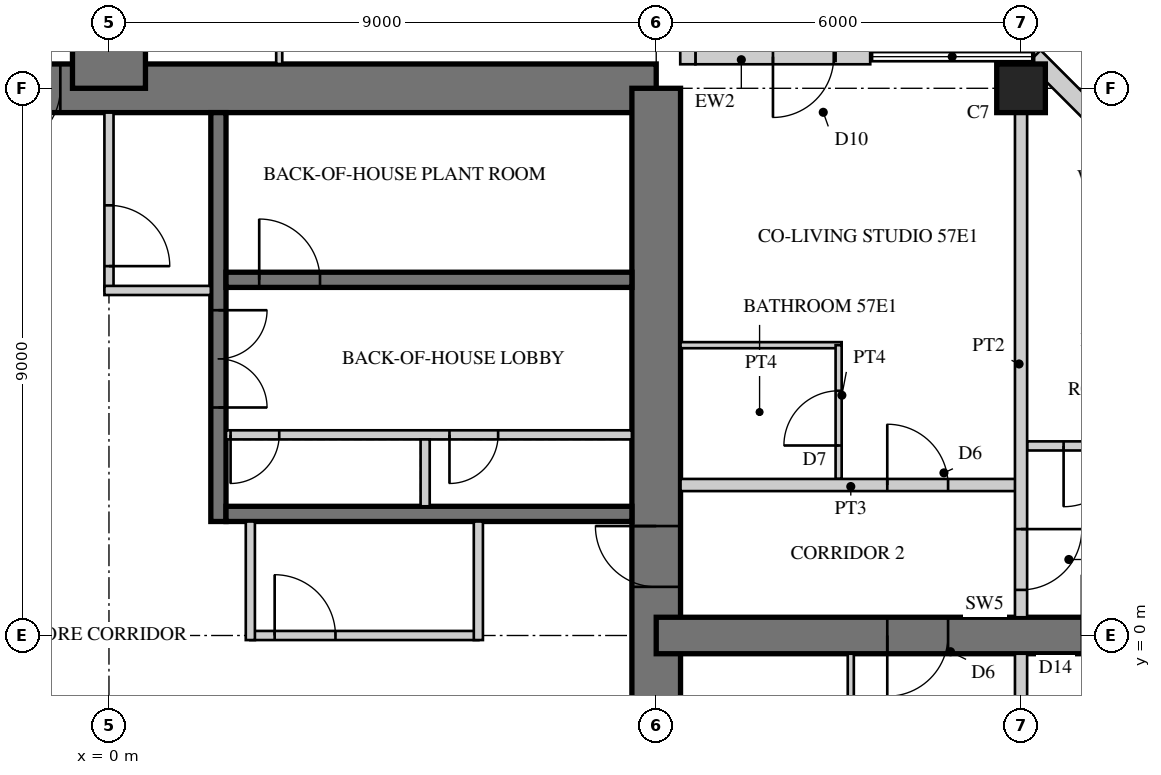
"""IFC4 building model, lengths in metres.
Left out: names, types, materials, properties, quantities, classifications, styles, units other than length and angle.
Written with IfcOpenShell. Run it as: python <this file> out.ifc"""

import sys

from ifc_helpers import new_model, si_unit, direction, frame, frame_2d, origin, origin_2d, place, context, subcontext, project, spatial, rectangle, hollow_rectangle, extrude, element, fill, save


model = new_model("IFC4")
c1 = context("Model", 3, precision=1e-05, world=origin(), true_north=direction((0.0, 1.0)))
c2 = subcontext(c1, "Body", "Model", "MODEL_VIEW")
j1 = project(units=[si_unit("LENGTHUNIT", "METRE"), si_unit("PLANEANGLEUNIT", "RADIAN")], contexts=[c1])
p1 = place(None, origin())
s1 = spatial("IfcSite", under=j1, at=p1, CompositionType="ELEMENT")
p2 = place(p1, origin())
s2 = spatial("IfcBuilding", under=s1, at=p2, CompositionType="ELEMENT")
p3 = place(p2, frame((0.0, 0.0, 225.5)))
s3 = spatial("IfcBuildingStorey", under=s2, at=p3, CompositionType="ELEMENT", Elevation=225.5)
p4 = place(p3, frame((9.0, 9.0, 0.0), z_axis=(0.0, 0.0, 1.0), x_axis=(-1.0, 0.0, 0.0)))
e1 = element("IfcWall", 1, at=p4, inside=s3, PredefinedType="SHEAR", context=c2, shape_type="SweptSolid", body=[
    extrude(rectangle(XDim=18.0, YDim=0.8, at=frame_2d((9.0, 0.0))), origin(), (0.0, 0.0, 1.0), 3.4),
])
p5 = place(p4, frame((9.8, 0.0, 0.0)))
e2 = element("IfcOpeningElement", 2, at=p5, cuts=e1, PredefinedType="OPENING", context=c2, shape_type="SweptSolid", body=[
    extrude(rectangle(XDim=1.0, YDim=2.4, at=frame_2d((0.5, 1.2))), frame((0.0, 0.41, 0.0), z_axis=(0.0, -1.0, 0.0), x_axis=(1.0, 0.0, 0.0)), (0.0, 0.0, 1.0), 0.82),
])
p6 = place(p3, frame((9.0, -9.0, 0.0), z_axis=(0.0, 0.0, 1.0), x_axis=(0.0, 1.0, 0.0)))
e3 = element("IfcWall", 3, at=p6, inside=s3, PredefinedType="SHEAR", context=c2, shape_type="SweptSolid", body=[
    extrude(rectangle(XDim=18.0, YDim=0.8, at=frame_2d((9.0, 0.0))), origin(), (0.0, 0.0, 1.0), 3.4),
])
p7 = place(p6, frame((9.8, 0.0, 0.0)))
e4 = element("IfcOpeningElement", 4, at=p7, cuts=e3, PredefinedType="OPENING", context=c2, shape_type="SweptSolid", body=[
    extrude(rectangle(XDim=1.0, YDim=2.4, at=frame_2d((0.5, 1.2))), frame((0.0, 0.41, 0.0), z_axis=(0.0, -1.0, 0.0), x_axis=(1.0, 0.0, 0.0)), (0.0, 0.0, 1.0), 0.82),
])
p8 = place(p3, frame((1.8, 1.875, 0.0), z_axis=(0.0, 0.0, 1.0), x_axis=(0.0, 1.0, 0.0)))
e5 = element("IfcWall", 5, at=p8, inside=s3, PredefinedType="SHEAR", context=c2, shape_type="SweptSolid", body=[
    extrude(rectangle(XDim=6.725, YDim=0.25, at=frame_2d((3.363, 0.0))), origin(), (0.0, 0.0, 1.0), 3.4),
])
p9 = place(p8, frame((1.875, 0.0, 0.0)))
e6 = element("IfcOpeningElement", 6, at=p9, cuts=e5, PredefinedType="OPENING", context=c2, shape_type="SweptSolid", body=[
    extrude(rectangle(XDim=1.6, YDim=2.4, at=frame_2d((0.8, 1.2))), frame((0.0, 0.135, 0.0), z_axis=(0.0, -1.0, 0.0), x_axis=(1.0, 0.0, 0.0)), (0.0, 0.0, 1.0), 0.27),
])
p10 = place(p3, frame((1.925, 2.0, 0.0), z_axis=(0.0, 0.0, 1.0), x_axis=(1.0, 0.0, 0.0)))
e7 = element("IfcWall", 7, at=p10, inside=s3, PredefinedType="SHEAR", context=c2, shape_type="SweptSolid", body=[
    extrude(rectangle(XDim=6.675, YDim=0.25, at=frame_2d((3.337, 0.0))), origin(), (0.0, 0.0, 1.0), 3.4),
])
p11 = place(p3, frame((1.925, 5.85, 0.0), z_axis=(0.0, 0.0, 1.0), x_axis=(1.0, 0.0, 0.0)))
e8 = element("IfcWall", 8, at=p11, inside=s3, PredefinedType="SHEAR", context=c2, shape_type="SweptSolid", body=[
    extrude(rectangle(XDim=6.675, YDim=0.25, at=frame_2d((3.337, 0.0))), origin(), (0.0, 0.0, 1.0), 3.4),
])
p12 = place(p11, frame((0.546, 0.0, 0.0)))
e9 = element("IfcOpeningElement", 9, at=p12, cuts=e8, PredefinedType="OPENING", context=c2, shape_type="SweptSolid", body=[
    extrude(rectangle(XDim=1.0, YDim=2.1, at=frame_2d((0.5, 1.05))), frame((0.0, 0.135, 0.0), z_axis=(0.0, -1.0, 0.0), x_axis=(1.0, 0.0, 0.0)), (0.0, 0.0, 1.0), 0.27),
])
p13 = place(p3, frame((1.925, 3.3, 0.0), z_axis=(0.0, 0.0, 1.0), x_axis=(1.0, 0.0, 0.0)))
e10 = element("IfcWall", 10, at=p13, inside=s3, PredefinedType="PARTITIONING", context=c2, shape_type="SweptSolid", body=[
    extrude(rectangle(XDim=6.675, YDim=0.15, at=frame_2d((3.337, 0.0))), origin(), (0.0, 0.0, 1.0), 3.4),
])
p14 = place(p13, frame((0.075, 0.0, 0.0)))
e11 = element("IfcOpeningElement", 11, at=p14, cuts=e10, PredefinedType="OPENING", context=c2, shape_type="SweptSolid", body=[
    extrude(rectangle(XDim=0.8, YDim=2.1, at=frame_2d((0.4, 1.05))), frame((0.0, 0.085, 0.0), z_axis=(0.0, -1.0, 0.0), x_axis=(1.0, 0.0, 0.0)), (0.0, 0.0, 1.0), 0.17),
])
p15 = place(p13, frame((3.675, 0.0, 0.0)))
e12 = element("IfcOpeningElement", 12, at=p15, cuts=e10, PredefinedType="OPENING", context=c2, shape_type="SweptSolid", body=[
    extrude(rectangle(XDim=0.8, YDim=2.1, at=frame_2d((0.4, 1.05))), frame((0.0, 0.085, 0.0), z_axis=(0.0, -1.0, 0.0), x_axis=(1.0, 0.0, 0.0)), (0.0, 0.0, 1.0), 0.17),
])
p16 = place(p3, frame((5.2, 2.125, 0.0), z_axis=(0.0, 0.0, 1.0), x_axis=(0.0, 1.0, 0.0)))
e13 = element("IfcWall", 13, at=p16, inside=s3, PredefinedType="PARTITIONING", context=c2, shape_type="SweptSolid", body=[
    extrude(rectangle(XDim=1.1, YDim=0.15, at=frame_2d((0.55, 0.0))), origin(), (0.0, 0.0, 1.0), 3.4),
])
p17 = place(p3, frame((0.0, 9.0, 0.0), z_axis=(0.0, 0.0, 1.0), x_axis=(0.0, 1.0, 0.0)))
e14 = element("IfcWall", 14, at=p17, inside=s3, PredefinedType="SHEAR", context=c2, shape_type="SweptSolid", body=[
    extrude(rectangle(XDim=9.0, YDim=1.2, at=frame_2d((4.5, 0.0))), origin(), (0.0, 0.0, 1.0), 3.4),
])
p18 = place(p17, frame((3.8, 0.0, 0.0)))
e15 = element("IfcOpeningElement", 15, at=p18, cuts=e14, PredefinedType="OPENING", context=c2, shape_type="SweptSolid", body=[
    extrude(rectangle(XDim=1.0, YDim=2.15, at=frame_2d((0.5, 1.075))), frame((0.0, 0.61, 0.0), z_axis=(0.0, -1.0, 0.0), x_axis=(1.0, 0.0, 0.0)), (0.0, 0.0, 1.0), 1.22),
])
p19 = place(p17, frame((7.0, 0.0, 0.0)))
e16 = element("IfcOpeningElement", 16, at=p19, cuts=e14, PredefinedType="OPENING", context=c2, shape_type="SweptSolid", body=[
    extrude(rectangle(XDim=1.0, YDim=2.2, at=frame_2d((0.5, 1.1))), frame((0.0, 0.61, 0.0), z_axis=(0.0, -1.0, 0.0), x_axis=(1.0, 0.0, 0.0)), (0.0, 0.0, 1.0), 1.22),
])
p20 = place(p3, frame((9.0, 0.0, 0.0), z_axis=(0.0, 0.0, 1.0), x_axis=(1.0, 0.0, 0.0)))
e17 = element("IfcWall", 17, at=p20, inside=s3, PredefinedType="SHEAR", context=c2, shape_type="SweptSolid", body=[
    extrude(rectangle(XDim=9.0, YDim=0.6, at=frame_2d((4.5, 0.0))), origin(), (0.0, 0.0, 1.0), 3.4),
])
p21 = place(p20, frame((3.8, 0.0, 0.0)))
e18 = element("IfcOpeningElement", 18, at=p21, cuts=e17, PredefinedType="OPENING", context=c2, shape_type="SweptSolid", body=[
    extrude(rectangle(XDim=1.0, YDim=2.15, at=frame_2d((0.5, 1.075))), frame((0.0, 0.31, 0.0), z_axis=(0.0, -1.0, 0.0), x_axis=(1.0, 0.0, 0.0)), (0.0, 0.0, 1.0), 0.62),
])
p22 = place(p20, frame((7.0, 0.0, 0.0)))
e19 = element("IfcOpeningElement", 19, at=p22, cuts=e17, PredefinedType="OPENING", context=c2, shape_type="SweptSolid", body=[
    extrude(rectangle(XDim=1.0, YDim=2.2, at=frame_2d((0.5, 1.1))), frame((0.0, 0.31, 0.0), z_axis=(0.0, -1.0, 0.0), x_axis=(1.0, 0.0, 0.0)), (0.0, 0.0, 1.0), 0.62),
])
p23 = place(p3, frame((15.0, 9.0, 0.0), z_axis=(0.0, 0.0, 1.0), x_axis=(1.0, 0.0, 0.0)))
e20 = element("IfcColumn", 20, at=p23, inside=s3, PredefinedType="COLUMN", context=c2, shape_type="SweptSolid", body=[
    extrude(rectangle(XDim=0.8, YDim=0.8, at=origin_2d()), origin(), (0.0, 0.0, 1.0), 3.4),
])
p24 = place(p3, frame((18.52, 6.215, 0.0), z_axis=(0.0, 0.0, 1.0), x_axis=(-0.707106781187, 0.707106781187, 0.0)))
e21 = element("IfcWall", 21, at=p24, inside=s3, PredefinedType="SOLIDWALL", context=c2, shape_type="SweptSolid", body=[
    extrude(rectangle(XDim=4.674, YDim=0.3, at=frame_2d((2.337, 0.0))), origin(), (0.0, 0.0, 1.0), 3.22),
])
p25 = place(p24, frame((1.887, 0.0, 0.3)))
e22 = element("IfcOpeningElement", 22, at=p25, cuts=e21, PredefinedType="OPENING", context=c2, shape_type="SweptSolid", body=[
    extrude(rectangle(XDim=0.9, YDim=2.4, at=frame_2d((0.45, 1.2))), frame((0.0, 0.16, 0.0), z_axis=(0.0, -1.0, 0.0), x_axis=(1.0, 0.0, 0.0)), (0.0, 0.0, 1.0), 0.32),
])
p26 = place(p3, frame((12.52, 9.52, 0.0), z_axis=(0.0, 0.0, 1.0), x_axis=(-1.0, 0.0, 0.0)))
e23 = element("IfcWall", 23, at=p26, inside=s3, PredefinedType="SOLIDWALL", context=c2, shape_type="SweptSolid", body=[
    extrude(rectangle(XDim=2.875, YDim=0.25, at=frame_2d((1.438, 0.0))), origin(), (0.0, 0.0, 1.0), 3.22),
])
p27 = place(p26, frame((0.6, 0.0, 0.0)))
e24 = element("IfcOpeningElement", 24, at=p27, cuts=e23, PredefinedType="OPENING", context=c2, shape_type="SweptSolid", body=[
    extrude(rectangle(XDim=1.0, YDim=2.2, at=frame_2d((0.5, 1.1))), frame((0.0, 0.135, 0.0), z_axis=(0.0, -1.0, 0.0), x_axis=(1.0, 0.0, 0.0)), (0.0, 0.0, 1.0), 0.27),
])
p28 = place(p3, frame((9.52, 9.395, 0.0), z_axis=(0.0, 0.0, 1.0), x_axis=(0.0, 1.0, 0.0)))
e25 = element("IfcWall", 25, at=p28, inside=s3, PredefinedType="SOLIDWALL", context=c2, shape_type="SweptSolid", body=[
    extrude(rectangle(XDim=3.125, YDim=0.25, at=frame_2d((1.562, 0.0))), origin(), (0.0, 0.0, 1.0), 3.22),
])
p29 = place(p28, frame((0.6, 0.0, 0.0)))
e26 = element("IfcOpeningElement", 26, at=p29, cuts=e25, PredefinedType="OPENING", context=c2, shape_type="SweptSolid", body=[
    extrude(rectangle(XDim=1.0, YDim=2.2, at=frame_2d((0.5, 1.1))), frame((0.0, 0.135, 0.0), z_axis=(0.0, -1.0, 0.0), x_axis=(1.0, 0.0, 0.0)), (0.0, 0.0, 1.0), 0.27),
])
p30 = place(p3, frame((2.325, 0.0, 0.0), z_axis=(0.0, 0.0, 1.0), x_axis=(1.0, 0.0, 0.0)))
e27 = element("IfcWall", 27, at=p30, inside=s3, PredefinedType="PARTITIONING", context=c2, shape_type="SweptSolid", body=[
    extrude(rectangle(XDim=3.75, YDim=0.15, at=frame_2d((1.875, 0.0))), origin(), (0.0, 0.0, 1.0), 3.22),
])
p31 = place(p30, frame((0.4, 0.0, 0.0)))
e28 = element("IfcOpeningElement", 28, at=p31, cuts=e27, PredefinedType="OPENING", context=c2, shape_type="SweptSolid", body=[
    extrude(rectangle(XDim=1.0, YDim=2.1, at=frame_2d((0.5, 1.05))), frame((0.0, 0.085, 0.0), z_axis=(0.0, -1.0, 0.0), x_axis=(1.0, 0.0, 0.0)), (0.0, 0.0, 1.0), 0.17),
])
for number, where, z_axis, x_axis in (
    (29, (2.325, 1.875, 0.0), (0.0, 0.0, 1.0), (0.0, -1.0, 0.0)),
    (30, (6.075, -0.075, 0.0), (0.0, 0.0, 1.0), (0.0, 1.0, 0.0)),
):
    element("IfcWall", number, at=place(p3, frame(where, z_axis=z_axis, x_axis=x_axis)), inside=s3, PredefinedType="PARTITIONING", context=c2, shape_type="SweptSolid", body=[
        extrude(rectangle(XDim=1.95, YDim=0.15, at=frame_2d((0.975, 0.0))), origin(), (0.0, 0.0, 1.0), 3.22),
    ])
p32 = place(p3, frame((0.0, 5.675, 0.0), z_axis=(0.0, 0.0, 1.0), x_axis=(0.0, 1.0, 0.0)))
e31 = element("IfcWall", 31, at=p32, inside=s3, PredefinedType="PARTITIONING", context=c2, shape_type="SweptSolid", body=[
    extrude(rectangle(XDim=2.925, YDim=0.15, at=frame_2d((1.462, 0.0))), origin(), (0.0, 0.0, 1.0), 3.22),
])
p33 = place(p32, frame((0.4, 0.0, 0.0)))
e32 = element("IfcOpeningElement", 32, at=p33, cuts=e31, PredefinedType="OPENING", context=c2, shape_type="SweptSolid", body=[
    extrude(rectangle(XDim=1.0, YDim=2.1, at=frame_2d((0.5, 1.05))), frame((0.0, 0.085, 0.0), z_axis=(0.0, -1.0, 0.0), x_axis=(1.0, 0.0, 0.0)), (0.0, 0.0, 1.0), 0.17),
])
p34 = place(p3, frame((1.675, 5.675, 0.0), z_axis=(0.0, 0.0, 1.0), x_axis=(-1.0, 0.0, 0.0)))
e33 = element("IfcWall", 33, at=p34, inside=s3, PredefinedType="PARTITIONING", context=c2, shape_type="SweptSolid", body=[
    extrude(rectangle(XDim=1.75, YDim=0.15, at=frame_2d((0.875, 0.0))), origin(), (0.0, 0.0, 1.0), 3.22),
])
for number, where, z_axis, x_axis in (
    (34, (2.8, 9.4, 0.0), (0.0, 0.0, 1.0), (0.0, 1.0, 0.0)),
    (35, (9.4, 4.775, 0.0), (0.0, 0.0, 1.0), (1.0, 0.0, 0.0)),
):
    element("IfcWall", number, at=place(p3, frame(where, z_axis=z_axis, x_axis=x_axis)), inside=s3, PredefinedType="PARTITIONING", context=c2, shape_type="SweptSolid", body=[
        extrude(rectangle(XDim=2.65, YDim=0.1, at=frame_2d((1.325, 0.0))), origin(), (0.0, 0.0, 1.0), 3.22),
    ])
p35 = place(p3, frame((12.0, 2.575, 0.0), z_axis=(0.0, 0.0, 1.0), x_axis=(0.0, 1.0, 0.0)))
e36 = element("IfcWall", 36, at=p35, inside=s3, PredefinedType="PARTITIONING", context=c2, shape_type="SweptSolid", body=[
    extrude(rectangle(XDim=2.2, YDim=0.1, at=frame_2d((1.1, 0.0))), origin(), (0.0, 0.0, 1.0), 3.22),
])
p36 = place(p35, frame((0.55, 0.0, 0.0)))
e37 = element("IfcOpeningElement", 37, at=p36, cuts=e36, PredefinedType="OPENING", context=c2, shape_type="SweptSolid", body=[
    extrude(rectangle(XDim=0.9, YDim=2.1, at=frame_2d((0.45, 1.05))), frame((0.0, 0.06, 0.0), z_axis=(0.0, -1.0, 0.0), x_axis=(1.0, 0.0, 0.0)), (0.0, 0.0, 1.0), 0.12),
])
p37 = place(p3, frame((12.2, -2.9, 0.0), z_axis=(0.0, 0.0, 1.0), x_axis=(0.0, 1.0, 0.0)))
e38 = element("IfcWall", 38, at=p37, inside=s3, PredefinedType="PARTITIONING", context=c2, shape_type="SweptSolid", body=[
    extrude(rectangle(XDim=2.6, YDim=0.1, at=frame_2d((1.3, 0.0))), origin(), (0.0, 0.0, 1.0), 3.22),
])
p38 = place(p37, frame((0.55, 0.0, 0.0)))
e39 = element("IfcOpeningElement", 39, at=p38, cuts=e38, PredefinedType="OPENING", context=c2, shape_type="SweptSolid", body=[
    extrude(rectangle(XDim=0.9, YDim=2.1, at=frame_2d((0.45, 1.05))), frame((0.0, 0.06, 0.0), z_axis=(0.0, -1.0, 0.0), x_axis=(1.0, 0.0, 0.0)), (0.0, 0.0, 1.0), 0.12),
])
p39 = place(p3, frame((9.4, 2.475, 0.0), z_axis=(0.0, 0.0, 1.0), x_axis=(1.0, 0.0, 0.0)))
e40 = element("IfcWall", 40, at=p39, inside=s3, PredefinedType="SOLIDWALL", context=c2, shape_type="SweptSolid", body=[
    extrude(rectangle(XDim=5.6, YDim=0.2, at=frame_2d((2.8, 0.0))), origin(), (0.0, 0.0, 1.0), 3.22),
])
p40 = place(p39, frame((3.4, 0.0, 0.0)))
e41 = element("IfcOpeningElement", 41, at=p40, cuts=e40, PredefinedType="OPENING", context=c2, shape_type="SweptSolid", body=[
    extrude(rectangle(XDim=1.0, YDim=2.15, at=frame_2d((0.5, 1.075))), frame((0.0, 0.11, 0.0), z_axis=(0.0, -1.0, 0.0), x_axis=(1.0, 0.0, 0.0)), (0.0, 0.0, 1.0), 0.22),
])
p41 = place(p3, frame((15.1, 3.118, 0.0), z_axis=(0.0, 0.0, 1.0), x_axis=(1.0, 0.0, 0.0)))
e42 = element("IfcWall", 42, at=p41, inside=s3, PredefinedType="PARTITIONING", context=c2, shape_type="SweptSolid", body=[
    extrude(rectangle(XDim=3.38, YDim=0.15, at=frame_2d((1.69, 0.0))), origin(), (0.0, 0.0, 1.0), 3.22),
])
p42 = place(p41, frame((0.6, 0.0, 0.0)))
e43 = element("IfcOpeningElement", 43, at=p42, cuts=e42, PredefinedType="OPENING", context=c2, shape_type="SweptSolid", body=[
    extrude(rectangle(XDim=1.0, YDim=2.1, at=frame_2d((0.5, 1.05))), frame((0.0, 0.085, 0.0), z_axis=(0.0, -1.0, 0.0), x_axis=(1.0, 0.0, 0.0)), (0.0, 0.0, 1.0), 0.17),
])
p43 = place(p3, frame((15.0, -8.6, 0.0), z_axis=(0.0, 0.0, 1.0), x_axis=(0.0, 1.0, 0.0)))
e44 = element("IfcWall", 44, at=p43, inside=s3, PredefinedType="SOLIDWALL", context=c2, shape_type="SweptSolid", body=[
    extrude(rectangle(XDim=8.3, YDim=0.2, at=frame_2d((4.15, 0.0))), origin(), (0.0, 0.0, 1.0), 2.52),
])
p44 = place(p3, frame((15.0, 0.3, 0.0), z_axis=(0.0, 0.0, 1.0), x_axis=(0.0, 1.0, 0.0)))
e45 = element("IfcWall", 45, at=p44, inside=s3, PredefinedType="SOLIDWALL", context=c2, shape_type="SweptSolid", body=[
    extrude(rectangle(XDim=8.3, YDim=0.2, at=frame_2d((4.15, 0.0))), origin(), (0.0, 0.0, 1.0), 2.52),
])
p45 = place(p44, frame((0.45, 0.0, 0.0)))
e46 = element("IfcOpeningElement", 46, at=p45, cuts=e45, PredefinedType="OPENING", context=c2, shape_type="SweptSolid", body=[
    extrude(rectangle(XDim=1.0, YDim=2.2, at=frame_2d((0.5, 1.1))), frame((0.0, 0.11, 0.0), z_axis=(0.0, -1.0, 0.0), x_axis=(1.0, 0.0, 0.0)), (0.0, 0.0, 1.0), 0.22),
])
p46 = place(p27, origin())
e47 = element("IfcDoor", 47, at=p46, inside=s3, OperationType="SINGLE_SWING_RIGHT", PredefinedType="DOOR", context=c2, shape_type="SweptSolid", body=[
    extrude(hollow_rectangle(XDim=1.0, YDim=2.2, WallThickness=0.06, at=frame_2d((0.5, 1.1))), frame((0.0, 0.025, 0.0), z_axis=(0.0, -1.0, 0.0), x_axis=(1.0, 0.0, 0.0)), (0.0, 0.0, 1.0), 0.05),
    extrude(rectangle(XDim=0.879, YDim=2.079, at=frame_2d((0.5, 1.1))), frame((0.0, 0.025, 0.0), z_axis=(0.0, -1.0, 0.0), x_axis=(1.0, 0.0, 0.0)), (0.0, 0.0, 1.0), 0.05),
])
fill(e24, e47)
p47 = place(p31, origin())
e48 = element("IfcDoor", 48, at=p47, inside=s3, OperationType="SINGLE_SWING_LEFT", PredefinedType="DOOR", context=c2, shape_type="SweptSolid", body=[
    extrude(rectangle(XDim=1.0, YDim=2.1, at=frame_2d((0.5, 1.05))), frame((0.0, 0.025, 0.0), z_axis=(0.0, -1.0, 0.0), x_axis=(1.0, 0.0, 0.0)), (0.0, 0.0, 1.0), 0.05),
])
fill(e28, e48)
p48 = place(p33, frame((1.0, 0.0, 0.0), z_axis=(0.0, 0.0, 1.0), x_axis=(-1.0, 0.0, 0.0)))
e49 = element("IfcDoor", 49, at=p48, inside=s3, OperationType="SINGLE_SWING_RIGHT", PredefinedType="DOOR", context=c2, shape_type="SweptSolid", body=[
    extrude(rectangle(XDim=1.0, YDim=2.1, at=frame_2d((0.5, 1.05))), frame((0.0, 0.025, 0.0), z_axis=(0.0, -1.0, 0.0), x_axis=(1.0, 0.0, 0.0)), (0.0, 0.0, 1.0), 0.05),
])
fill(e32, e49)
p49 = place(p36, origin())
e50 = element("IfcDoor", 50, at=p49, inside=s3, OperationType="SINGLE_SWING_LEFT", PredefinedType="DOOR", context=c2, shape_type="SweptSolid", body=[
    extrude(rectangle(XDim=0.9, YDim=2.1, at=frame_2d((0.45, 1.05))), frame((0.0, 0.025, 0.0), z_axis=(0.0, -1.0, 0.0), x_axis=(1.0, 0.0, 0.0)), (0.0, 0.0, 1.0), 0.05),
])
fill(e37, e50)
p50 = place(p40, origin())
e51 = element("IfcDoor", 51, at=p50, inside=s3, OperationType="SINGLE_SWING_LEFT", PredefinedType="DOOR", context=c2, shape_type="SweptSolid", body=[
    extrude(rectangle(XDim=1.0, YDim=2.15, at=frame_2d((0.5, 1.075))), frame((0.0, 0.025, 0.0), z_axis=(0.0, -1.0, 0.0), x_axis=(1.0, 0.0, 0.0)), (0.0, 0.0, 1.0), 0.05),
])
fill(e41, e51)
p51 = place(p42, frame((1.0, 0.0, 0.0), z_axis=(0.0, 0.0, 1.0), x_axis=(-1.0, 0.0, 0.0)))
e52 = element("IfcDoor", 52, at=p51, inside=s3, OperationType="SINGLE_SWING_RIGHT", PredefinedType="DOOR", context=c2, shape_type="SweptSolid", body=[
    extrude(rectangle(XDim=1.0, YDim=2.1, at=frame_2d((0.5, 1.05))), frame((0.0, 0.025, 0.0), z_axis=(0.0, -1.0, 0.0), x_axis=(1.0, 0.0, 0.0)), (0.0, 0.0, 1.0), 0.05),
])
fill(e43, e52)
p52 = place(p45, frame((1.0, 0.0, 0.0), z_axis=(0.0, 0.0, 1.0), x_axis=(-1.0, 0.0, 0.0)))
e53 = element("IfcDoor", 53, at=p52, inside=s3, OperationType="SINGLE_SWING_LEFT", PredefinedType="DOOR", context=c2, shape_type="SweptSolid", body=[
    extrude(rectangle(XDim=1.0, YDim=2.2, at=frame_2d((0.5, 1.1))), frame((0.0, 0.025, 0.0), z_axis=(0.0, -1.0, 0.0), x_axis=(1.0, 0.0, 0.0)), (0.0, 0.0, 1.0), 0.05),
])
fill(e46, e53)
p53 = place(p21, frame((1.0, 0.0, 0.0), z_axis=(0.0, 0.0, 1.0), x_axis=(-1.0, 0.0, 0.0)))
e54 = element("IfcDoor", 54, at=p53, inside=s3, OperationType="SINGLE_SWING_RIGHT", PredefinedType="DOOR", context=c2, shape_type="SweptSolid", body=[
    extrude(rectangle(XDim=1.0, YDim=2.15, at=frame_2d((0.5, 1.075))), frame((0.0, 0.025, 0.0), z_axis=(0.0, -1.0, 0.0), x_axis=(1.0, 0.0, 0.0)), (0.0, 0.0, 1.0), 0.05),
])
fill(e18, e54)
p54 = place(p5, origin())
e55 = element("IfcDoor", 55, at=p54, inside=s3, OperationType="SINGLE_SWING_RIGHT", PredefinedType="DOOR", context=c2, shape_type="SweptSolid", body=[
    extrude(rectangle(XDim=1.0, YDim=2.4, at=frame_2d((0.5, 1.2))), frame((0.0, 0.055, 0.0), z_axis=(0.0, -1.0, 0.0), x_axis=(1.0, 0.0, 0.0)), (0.0, 0.0, 1.0), 0.05),
])
fill(e2, e55)
p55 = place(p7, origin())
e56 = element("IfcDoor", 56, at=p55, inside=s3, OperationType="SINGLE_SWING_RIGHT", PredefinedType="DOOR", context=c2, shape_type="SweptSolid", body=[
    extrude(rectangle(XDim=1.0, YDim=2.4, at=frame_2d((0.5, 1.2))), frame((0.0, 0.055, 0.0), z_axis=(0.0, -1.0, 0.0), x_axis=(1.0, 0.0, 0.0)), (0.0, 0.0, 1.0), 0.05),
])
fill(e4, e56)
p56 = place(p9, frame((1.6, 0.0, 0.0), z_axis=(0.0, 0.0, 1.0), x_axis=(-1.0, 0.0, 0.0)))
e57 = element("IfcDoor", 57, at=p56, inside=s3, OperationType="DOUBLE_DOOR_SINGLE_SWING", PredefinedType="DOOR", context=c2, shape_type="SweptSolid", body=[
    extrude(rectangle(XDim=1.6, YDim=2.4, at=frame_2d((0.8, 1.2))), frame((0.0, 0.025, 0.0), z_axis=(0.0, -1.0, 0.0), x_axis=(1.0, 0.0, 0.0)), (0.0, 0.0, 1.0), 0.05),
])
fill(e6, e57)
p57 = place(p14, frame((0.8, 0.0, 0.0), z_axis=(0.0, 0.0, 1.0), x_axis=(-1.0, 0.0, 0.0)))
e58 = element("IfcDoor", 58, at=p57, inside=s3, OperationType="SINGLE_SWING_RIGHT", PredefinedType="DOOR", context=c2, shape_type="SweptSolid", body=[
    extrude(rectangle(XDim=0.8, YDim=2.1, at=frame_2d((0.4, 1.05))), frame((0.0, 0.025, 0.0), z_axis=(0.0, -1.0, 0.0), x_axis=(1.0, 0.0, 0.0)), (0.0, 0.0, 1.0), 0.05),
])
fill(e11, e58)
p58 = place(p15, frame((0.8, 0.0, 0.0), z_axis=(0.0, 0.0, 1.0), x_axis=(-1.0, 0.0, 0.0)))
e59 = element("IfcDoor", 59, at=p58, inside=s3, OperationType="SINGLE_SWING_RIGHT", PredefinedType="DOOR", context=c2, shape_type="SweptSolid", body=[
    extrude(rectangle(XDim=0.8, YDim=2.1, at=frame_2d((0.4, 1.05))), frame((0.0, 0.025, 0.0), z_axis=(0.0, -1.0, 0.0), x_axis=(1.0, 0.0, 0.0)), (0.0, 0.0, 1.0), 0.05),
])
fill(e12, e59)
p59 = place(p12, origin())
e60 = element("IfcDoor", 60, at=p59, inside=s3, OperationType="SINGLE_SWING_LEFT", PredefinedType="DOOR", context=c2, shape_type="SweptSolid", body=[
    extrude(rectangle(XDim=1.0, YDim=2.1, at=frame_2d((0.5, 1.05))), frame((0.0, 0.025, 0.0), z_axis=(0.0, -1.0, 0.0), x_axis=(1.0, 0.0, 0.0)), (0.0, 0.0, 1.0), 0.05),
])
fill(e9, e60)
save(model, sys.argv[1])
